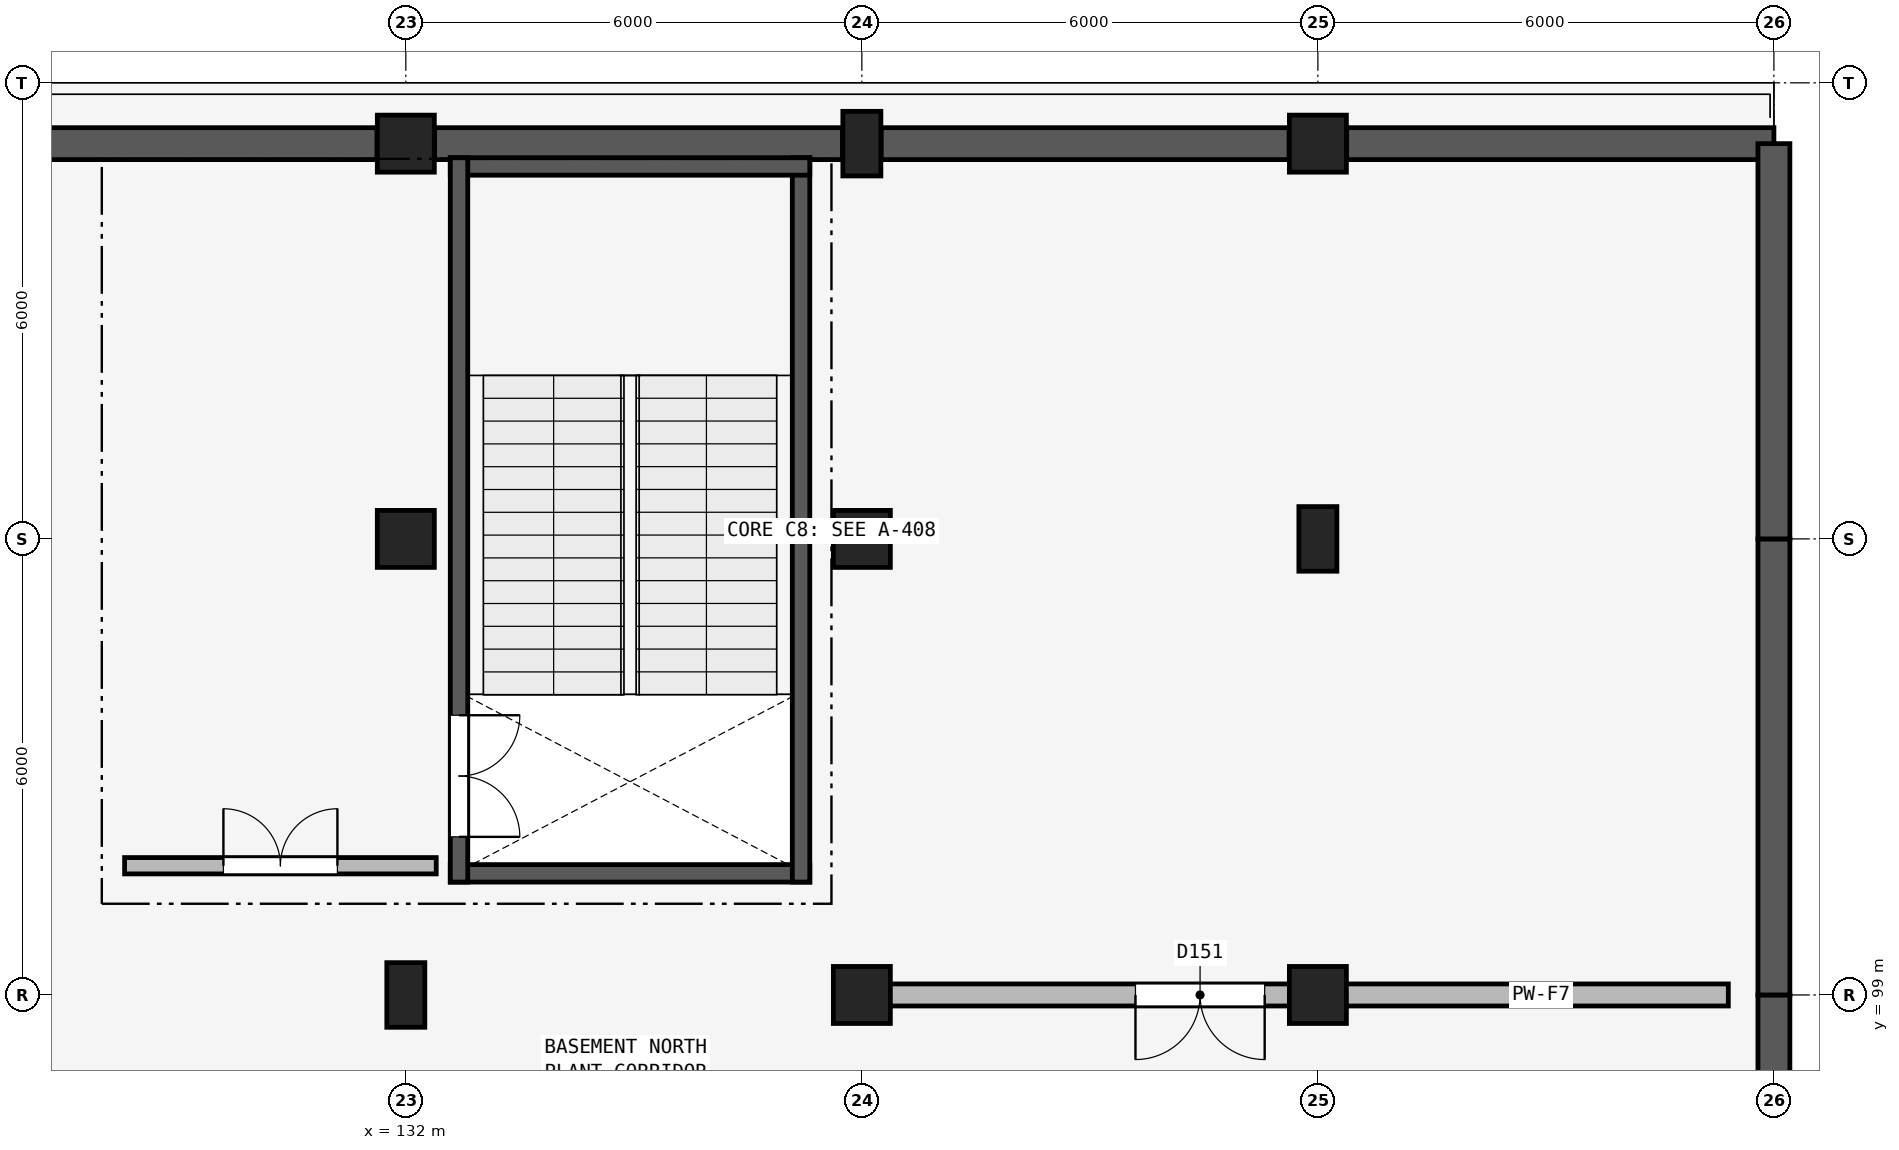
"""IFC4 building model, lengths in metres.
Left out: names, types, materials, properties, quantities, classifications, styles, units other than length and angle.
Written with IfcOpenShell. Run it as: python <this file> out.ifc"""

import sys

from ifc_helpers import new_model, si_unit, direction, frame, frame_2d, origin, origin_2d, place, context, subcontext, project, spatial, rectangle, extrude, element, fill, save


model = new_model("IFC4")
c1 = context("Model", 3, precision=1e-05, world=origin(), true_north=direction((0.0, 1.0)))
c2 = subcontext(c1, "Body", "Model", "MODEL_VIEW")
j1 = project(units=[si_unit("LENGTHUNIT", "METRE"), si_unit("PLANEANGLEUNIT", "RADIAN")], contexts=[c1])
p1 = place(None, origin())
s1 = spatial("IfcSite", under=j1, at=p1, CompositionType="ELEMENT")
p2 = place(p1, origin())
s2 = spatial("IfcBuilding", under=s1, at=p2, CompositionType="ELEMENT")
p3 = place(p2, frame((0.0, 0.0, -4.5)))
s3 = spatial("IfcBuildingStorey", under=s2, at=p3, CompositionType="ELEMENT", Elevation=-4.5)
p4 = place(p3, frame((132.0, 99.0, 0.0), z_axis=(0.0, 0.0, 1.0), x_axis=(1.0, 0.0, 0.0)))
e1 = element("IfcColumn", 1, at=p4, inside=s3, PredefinedType="COLUMN", context=c2, shape_type="SweptSolid", body=[
    extrude(rectangle(XDim=0.5, YDim=0.85, at=origin_2d()), origin(), (0.0, 0.0, 1.0), 4.5),
])
for number, where, z_axis, x_axis in (
    (2, (132.0, 105.0, 0.0), (0.0, 0.0, 1.0), (1.0, 0.0, 0.0)),
    (3, (132.0, 110.2, 0.0), (0.0, 0.0, 1.0), (1.0, 0.0, 0.0)),
    (4, (138.0, 99.0, 0.0), (0.0, 0.0, 1.0), (1.0, 0.0, 0.0)),
    (5, (138.0, 105.0, 0.0), (0.0, 0.0, 1.0), (1.0, 0.0, 0.0)),
):
    element("IfcColumn", number, at=place(p3, frame(where, z_axis=z_axis, x_axis=x_axis)), inside=s3, PredefinedType="COLUMN", context=c2, shape_type="SweptSolid", body=[
        extrude(rectangle(XDim=0.75, YDim=0.75, at=origin_2d()), origin(), (0.0, 0.0, 1.0), 4.5),
    ])
p5 = place(p3, frame((138.0, 110.2, 0.0), z_axis=(0.0, 0.0, 1.0), x_axis=(1.0, 0.0, 0.0)))
e6 = element("IfcColumn", 6, at=p5, inside=s3, PredefinedType="COLUMN", context=c2, shape_type="SweptSolid", body=[
    extrude(rectangle(XDim=0.5, YDim=0.85, at=origin_2d()), origin(), (0.0, 0.0, 1.0), 4.5),
])
p6 = place(p3, frame((144.0, 99.0, 0.0), z_axis=(0.0, 0.0, 1.0), x_axis=(1.0, 0.0, 0.0)))
e7 = element("IfcColumn", 7, at=p6, inside=s3, PredefinedType="COLUMN", context=c2, shape_type="SweptSolid", body=[
    extrude(rectangle(XDim=0.75, YDim=0.75, at=origin_2d()), origin(), (0.0, 0.0, 1.0), 4.5),
])
p7 = place(p3, frame((144.0, 105.0, 0.0), z_axis=(0.0, 0.0, 1.0), x_axis=(1.0, 0.0, 0.0)))
e8 = element("IfcColumn", 8, at=p7, inside=s3, PredefinedType="COLUMN", context=c2, shape_type="SweptSolid", body=[
    extrude(rectangle(XDim=0.5, YDim=0.85, at=origin_2d()), origin(), (0.0, 0.0, 1.0), 4.5),
])
p8 = place(p3, frame((144.0, 110.2, 0.0), z_axis=(0.0, 0.0, 1.0), x_axis=(1.0, 0.0, 0.0)))
e9 = element("IfcColumn", 9, at=p8, inside=s3, PredefinedType="COLUMN", context=c2, shape_type="SweptSolid", body=[
    extrude(rectangle(XDim=0.75, YDim=0.75, at=origin_2d()), origin(), (0.0, 0.0, 1.0), 4.5),
])
p9 = place(p3, frame((126.379, 110.2, 0.0), z_axis=(0.0, 0.0, 1.0), x_axis=(1.0, 0.0, 0.0)))
e10 = element("IfcWall", 10, at=p9, inside=s3, PredefinedType="SHEAR", context=c2, shape_type="SweptSolid", body=[
    extrude(rectangle(XDim=5.242, YDim=0.42, at=frame_2d((2.621, 0.0))), origin(), (0.0, 0.0, 1.0), 4.195),
])
for number, where, z_axis, x_axis in (
    (11, (132.379, 110.2, 0.0), (0.0, 0.0, 1.0), (1.0, 0.0, 0.0)),
    (12, (138.254, 110.2, 0.0), (0.0, 0.0, 1.0), (1.0, 0.0, 0.0)),
):
    element("IfcWall", number, at=place(p3, frame(where, z_axis=z_axis, x_axis=x_axis)), inside=s3, PredefinedType="SHEAR", context=c2, shape_type="SweptSolid", body=[
        extrude(rectangle(XDim=5.367, YDim=0.42, at=frame_2d((2.684, 0.0))), origin(), (0.0, 0.0, 1.0), 4.195),
    ])
p10 = place(p3, frame((144.379, 110.2, 0.0), z_axis=(0.0, 0.0, 1.0), x_axis=(1.0, 0.0, 0.0)))
e13 = element("IfcWall", 13, at=p10, inside=s3, PredefinedType="SHEAR", context=c2, shape_type="SweptSolid", body=[
    extrude(rectangle(XDim=5.621, YDim=0.42, at=frame_2d((2.811, 0.0))), origin(), (0.0, 0.0, 1.0), 4.195),
])
p11 = place(p3, frame((150.0, 93.304, 0.0), z_axis=(0.0, 0.0, 1.0), x_axis=(0.0, 1.0, 0.0)))
e14 = element("IfcWall", 14, at=p11, inside=s3, PredefinedType="SHEAR", context=c2, shape_type="SweptSolid", body=[
    extrude(rectangle(XDim=5.696, YDim=0.42, at=frame_2d((2.848, 0.0))), origin(), (0.0, 0.0, 1.0), 4.195),
])
p12 = place(p3, frame((150.0, 99.0, 0.0), z_axis=(0.0, 0.0, 1.0), x_axis=(0.0, 1.0, 0.0)))
e15 = element("IfcWall", 15, at=p12, inside=s3, PredefinedType="SHEAR", context=c2, shape_type="SweptSolid", body=[
    extrude(rectangle(XDim=6.0, YDim=0.42, at=frame_2d((3.0, 0.0))), origin(), (0.0, 0.0, 1.0), 4.195),
])
p13 = place(p3, frame((150.0, 105.0, 0.0), z_axis=(0.0, 0.0, 1.0), x_axis=(0.0, 1.0, 0.0)))
e16 = element("IfcWall", 16, at=p13, inside=s3, PredefinedType="SHEAR", context=c2, shape_type="SweptSolid", body=[
    extrude(rectangle(XDim=5.2, YDim=0.42, at=frame_2d((2.6, 0.0))), origin(), (0.0, 0.0, 1.0), 4.195),
])
p14 = place(p3, frame((132.585, 100.6, 0.0), z_axis=(0.0, 0.0, 1.0), x_axis=(1.0, 0.0, 0.0)))
e17 = element("IfcWall", 17, at=p14, inside=s3, PredefinedType="SHEAR", context=c2, shape_type="SweptSolid", body=[
    extrude(rectangle(XDim=4.73, YDim=0.23, at=frame_2d((2.365, 0.0))), origin(), (0.0, 0.0, 1.0), 4.36),
])
p15 = place(p3, frame((137.2, 100.485, 0.0), z_axis=(0.0, 0.0, 1.0), x_axis=(0.0, 1.0, 0.0)))
e18 = element("IfcWall", 18, at=p15, inside=s3, PredefinedType="SHEAR", context=c2, shape_type="SweptSolid", body=[
    extrude(rectangle(XDim=9.53, YDim=0.23, at=frame_2d((4.765, 0.0))), origin(), (0.0, 0.0, 1.0), 4.36),
])
p16 = place(p3, frame((137.315, 109.9, 0.0), z_axis=(0.0, 0.0, 1.0), x_axis=(-1.0, 0.0, 0.0)))
e19 = element("IfcWall", 19, at=p16, inside=s3, PredefinedType="SHEAR", context=c2, shape_type="SweptSolid", body=[
    extrude(rectangle(XDim=4.73, YDim=0.23, at=frame_2d((2.365, 0.0))), origin(), (0.0, 0.0, 1.0), 4.36),
])
p17 = place(p3, frame((132.7, 110.015, 0.0), z_axis=(0.0, 0.0, 1.0), x_axis=(0.0, -1.0, 0.0)))
e20 = element("IfcWall", 20, at=p17, inside=s3, PredefinedType="SHEAR", context=c2, shape_type="SweptSolid", body=[
    extrude(rectangle(XDim=9.53, YDim=0.23, at=frame_2d((4.765, 0.0))), origin(), (0.0, 0.0, 1.0), 4.36),
])
p18 = place(p17, frame((7.335, 0.0, 0.0)))
e21 = element("IfcOpeningElement", 21, at=p18, cuts=e20, PredefinedType="OPENING", context=c2, shape_type="SweptSolid", body=[
    extrude(rectangle(XDim=1.6, YDim=2.2, at=frame_2d((0.8, 1.1))), frame((0.0, 0.125, 0.0), z_axis=(0.0, -1.0, 0.0), x_axis=(1.0, 0.0, 0.0)), (0.0, 0.0, 1.0), 0.25),
])
p19 = place(p3, frame((128.3, 100.7, 0.0), z_axis=(0.0, 0.0, 1.0), x_axis=(1.0, 0.0, 0.0)))
e22 = element("IfcWall", 22, at=p19, inside=s3, PredefinedType="PARTITIONING", context=c2, shape_type="SweptSolid", body=[
    extrude(rectangle(XDim=4.1, YDim=0.215, at=frame_2d((2.05, 0.0))), origin(), (0.0, 0.0, 1.0), 3.44),
])
p20 = place(p19, frame((1.3, 0.0, 0.0)))
e23 = element("IfcOpeningElement", 23, at=p20, cuts=e22, PredefinedType="OPENING", context=c2, shape_type="SweptSolid", body=[
    extrude(rectangle(XDim=1.5, YDim=2.15, at=frame_2d((0.75, 1.075))), frame((0.0, 0.117, 0.0), z_axis=(0.0, -1.0, 0.0), x_axis=(1.0, 0.0, 0.0)), (0.0, 0.0, 1.0), 0.235),
])
p21 = place(p3, frame((149.4, 99.0, 0.0), z_axis=(0.0, 0.0, 1.0), x_axis=(-1.0, 0.0, 0.0)))
e24 = element("IfcWall", 24, at=p21, inside=s3, PredefinedType="PARTITIONING", context=c2, shape_type="SweptSolid", body=[
    extrude(rectangle(XDim=11.2, YDim=0.29, at=frame_2d((5.6, 0.0))), origin(), (0.0, 0.0, 1.0), 2.99),
])
p22 = place(p21, frame((6.1, 0.0, 0.0)))
e25 = element("IfcOpeningElement", 25, at=p22, cuts=e24, PredefinedType="OPENING", context=c2, shape_type="SweptSolid", body=[
    extrude(rectangle(XDim=1.7, YDim=2.35, at=frame_2d((0.85, 1.175))), frame((0.0, 0.155, 0.0), z_axis=(0.0, -1.0, 0.0), x_axis=(1.0, 0.0, 0.0)), (0.0, 0.0, 1.0), 0.31),
])
p23 = place(p18, origin())
e26 = element("IfcDoor", 26, at=p23, inside=s3, OperationType="DOUBLE_DOOR_SINGLE_SWING", PredefinedType="DOOR", context=c2, shape_type="SweptSolid", body=[
    extrude(rectangle(XDim=1.6, YDim=2.2, at=frame_2d((0.8, 1.1))), frame((0.0, 0.025, 0.0), z_axis=(0.0, -1.0, 0.0), x_axis=(1.0, 0.0, 0.0)), (0.0, 0.0, 1.0), 0.05),
])
fill(e21, e26)
p24 = place(p20, origin())
e27 = element("IfcDoor", 27, at=p24, inside=s3, OperationType="DOUBLE_DOOR_SINGLE_SWING", PredefinedType="DOOR", context=c2, shape_type="SweptSolid", body=[
    extrude(rectangle(XDim=1.5, YDim=2.15, at=frame_2d((0.75, 1.075))), frame((0.0, 0.025, 0.0), z_axis=(0.0, -1.0, 0.0), x_axis=(1.0, 0.0, 0.0)), (0.0, 0.0, 1.0), 0.05),
])
fill(e23, e27)
p25 = place(p22, origin())
e28 = element("IfcDoor", 28, at=p25, inside=s3, OperationType="DOUBLE_DOOR_SINGLE_SWING", PredefinedType="DOOR", context=c2, shape_type="SweptSolid", body=[
    extrude(rectangle(XDim=1.7, YDim=2.35, at=frame_2d((0.85, 1.175))), frame((0.0, 0.025, 0.0), z_axis=(0.0, -1.0, 0.0), x_axis=(1.0, 0.0, 0.0)), (0.0, 0.0, 1.0), 0.05),
])
fill(e25, e28)
save(model, sys.argv[1])
